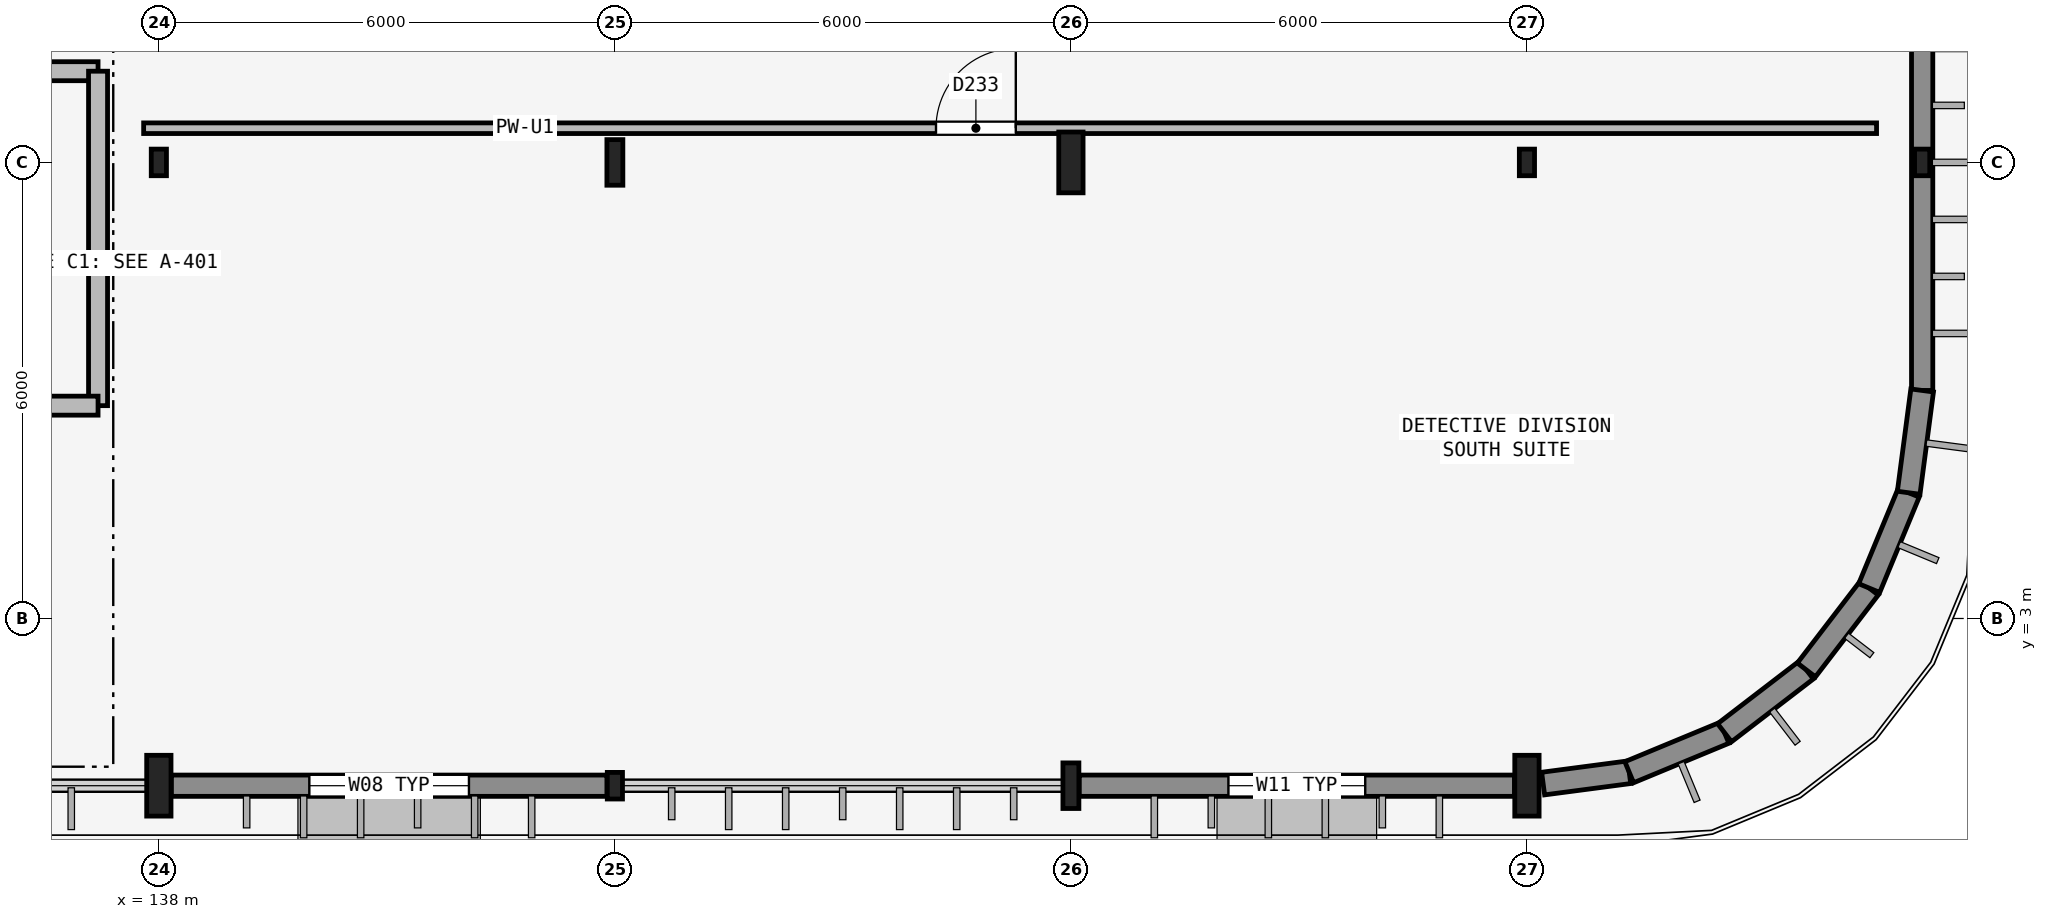
"""IFC4 building model, lengths in metres.
Left out: names, types, materials, properties, quantities, classifications, styles, units other than length and angle.
Written with IfcOpenShell. Run it as: python <this file> out.ifc"""

import sys

from ifc_helpers import new_model, si_unit, direction, frame, frame_2d, origin, origin_2d, place, context, subcontext, project, spatial, rectangle, hollow_rectangle, i_section, extrude, element, fill, save


model = new_model("IFC4")
c1 = context("Model", 3, precision=1e-05, world=origin(), true_north=direction((0.0, 1.0)))
c2 = subcontext(c1, "Body", "Model", "MODEL_VIEW")
j1 = project(units=[si_unit("LENGTHUNIT", "METRE"), si_unit("PLANEANGLEUNIT", "RADIAN")], contexts=[c1])
p1 = place(None, origin())
s1 = spatial("IfcSite", under=j1, at=p1, CompositionType="ELEMENT")
p2 = place(p1, origin())
s2 = spatial("IfcBuilding", under=s1, at=p2, CompositionType="ELEMENT")
p3 = place(p2, frame((0.0, 0.0, 9.3)))
s3 = spatial("IfcBuildingStorey", under=s2, at=p3, CompositionType="ELEMENT", Elevation=9.3)
p4 = place(p3, frame((138.0, 0.8, 0.0), z_axis=(0.0, 0.0, 1.0), x_axis=(1.0, 0.0, 0.0)))
e1 = element("IfcColumn", 1, at=p4, inside=s3, PredefinedType="COLUMN", context=c2, shape_type="SweptSolid", body=[
    extrude(i_section(OverallWidth=0.32, OverallDepth=0.8, WebThickness=0.016, FlangeThickness=0.028, at=origin_2d()), origin(), (0.0, 0.0, 1.0), 4.2),
])
for number, where, z_axis, x_axis in (
    (2, (138.0, 9.0, 0.0), (0.0, 0.0, 1.0), (1.0, 0.0, 0.0)),
    (3, (144.0, 0.8, 0.0), (0.0, 0.0, 1.0), (1.0, 0.0, 0.0)),
):
    element("IfcColumn", number, at=place(p3, frame(where, z_axis=z_axis, x_axis=x_axis)), inside=s3, PredefinedType="COLUMN", context=c2, shape_type="SweptSolid", body=[
        extrude(hollow_rectangle(XDim=0.2, YDim=0.35, WallThickness=0.012, InnerFilletRadius=0.012, OuterFilletRadius=0.024, at=origin_2d()), origin(), (0.0, 0.0, 1.0), 4.2),
    ])
for number, where, z_axis, x_axis in (
    (4, (144.0, 9.0, 0.0), (0.0, 0.0, 1.0), (1.0, 0.0, 0.0)),
    (5, (150.0, 0.8, 0.0), (0.0, 0.0, 1.0), (1.0, 0.0, 0.0)),
):
    element("IfcColumn", number, at=place(p3, frame(where, z_axis=z_axis, x_axis=x_axis)), inside=s3, PredefinedType="COLUMN", context=c2, shape_type="SweptSolid", body=[
        extrude(i_section(OverallWidth=0.21, OverallDepth=0.6, WebThickness=0.012, FlangeThickness=0.021, FilletRadius=0.02, at=origin_2d()), origin(), (0.0, 0.0, 1.0), 4.2),
    ])
for number, where, z_axis, x_axis in (
    (6, (150.0, 9.0, 0.0), (0.0, 0.0, 1.0), (1.0, 0.0, 0.0)),
    (7, (156.0, 0.8, 0.0), (0.0, 0.0, 1.0), (1.0, 0.0, 0.0)),
):
    element("IfcColumn", number, at=place(p3, frame(where, z_axis=z_axis, x_axis=x_axis)), inside=s3, PredefinedType="COLUMN", context=c2, shape_type="SweptSolid", body=[
        extrude(i_section(OverallWidth=0.32, OverallDepth=0.8, WebThickness=0.016, FlangeThickness=0.028, at=origin_2d()), origin(), (0.0, 0.0, 1.0), 4.2),
    ])
for number, where, z_axis, x_axis in (
    (8, (156.0, 9.0, 0.0), (0.0, 0.0, 1.0), (1.0, 0.0, 0.0)),
    (9, (161.2, 9.0, 0.0), (0.0, 0.0, 1.0), (1.0, 0.0, 0.0)),
):
    element("IfcColumn", number, at=place(p3, frame(where, z_axis=z_axis, x_axis=x_axis)), inside=s3, PredefinedType="COLUMN", context=c2, shape_type="SweptSolid", body=[
        extrude(hollow_rectangle(XDim=0.2, YDim=0.35, WallThickness=0.012, InnerFilletRadius=0.012, OuterFilletRadius=0.024, at=origin_2d()), origin(), (0.0, 0.0, 1.0), 4.2),
    ])
p5 = place(p3, frame((138.164, 0.8, 0.0), z_axis=(0.0, 0.0, 1.0), x_axis=(1.0, 0.0, 0.0)))
e10 = element("IfcWall", 10, at=p5, inside=s3, PredefinedType="SOLIDWALL", context=c2, shape_type="SweptSolid", body=[
    extrude(rectangle(XDim=5.732, YDim=0.28, at=frame_2d((2.866, 0.0))), origin(), (0.0, 0.0, 1.0), 3.484),
])
p6 = place(p5, frame((1.816, 0.0, 0.9)))
e11 = element("IfcOpeningElement", 11, at=p6, cuts=e10, PredefinedType="OPENING", context=c2, shape_type="SweptSolid", body=[
    extrude(rectangle(XDim=2.1, YDim=1.5, at=frame_2d((1.05, 0.75))), frame((0.0, 0.15, 0.0), z_axis=(0.0, -1.0, 0.0), x_axis=(1.0, 0.0, 0.0)), (0.0, 0.0, 1.0), 0.3),
])
p7 = place(p3, frame((150.109, 0.8, 0.0), z_axis=(0.0, 0.0, 1.0), x_axis=(1.0, 0.0, 0.0)))
e12 = element("IfcWall", 12, at=p7, inside=s3, PredefinedType="SOLIDWALL", context=c2, shape_type="SweptSolid", body=[
    extrude(rectangle(XDim=5.727, YDim=0.28, at=frame_2d((2.864, 0.0))), origin(), (0.0, 0.0, 1.0), 3.484),
])
p8 = place(p7, frame((1.963, 0.0, 0.6)))
e13 = element("IfcOpeningElement", 13, at=p8, cuts=e12, PredefinedType="OPENING", context=c2, shape_type="SweptSolid", body=[
    extrude(rectangle(XDim=1.8, YDim=2.2, at=frame_2d((0.9, 1.1))), frame((0.0, 0.15, 0.0), z_axis=(0.0, -1.0, 0.0), x_axis=(1.0, 0.0, 0.0)), (0.0, 0.0, 1.0), 0.3),
])
p9 = place(p3, frame((161.2, 6.0, 0.0), z_axis=(0.0, 0.0, 1.0), x_axis=(0.0, 1.0, 0.0)))
e14 = element("IfcWall", 14, at=p9, inside=s3, PredefinedType="SOLIDWALL", context=c2, shape_type="SweptSolid", body=[
    extrude(rectangle(XDim=6.0, YDim=0.28, at=frame_2d((3.0, 0.0))), origin(), (0.0, 0.0, 1.0), 3.49),
])
p10 = place(p3, frame((156.213, 0.828, 0.0), z_axis=(0.0, 0.0, 1.0), x_axis=(0.991417173479, 0.130736330569, 0.0)))
e15 = element("IfcWall", 15, at=p10, inside=s3, PredefinedType="SOLIDWALL", context=c2, shape_type="SweptSolid", body=[
    extrude(rectangle(XDim=1.143, YDim=0.3, at=frame_2d((0.571, 0.0))), origin(), (0.0, 0.0, 1.0), 3.484),
])
for number, where, z_axis, x_axis in (
    (16, (157.346, 0.977, 0.0), (0.0, 0.0, 1.0), (0.924, 0.383, 0.0)),
    (17, (158.6, 1.497, 0.0), (0.0, 0.0, 1.0), (0.793, 0.609, 0.0)),
    (18, (159.677, 2.323, 0.0), (0.0, 0.0, 1.0), (0.609, 0.793, 0.0)),
    (19, (160.503, 3.4, 0.0), (0.0, 0.0, 1.0), (0.383, 0.924, 0.0)),
):
    element("IfcWall", number, at=place(p3, frame(where, z_axis=z_axis, x_axis=x_axis)), inside=s3, PredefinedType="SOLIDWALL", context=c2, shape_type="SweptSolid", body=[
        extrude(rectangle(XDim=1.357, YDim=0.3, at=frame_2d((0.679, 0.0))), origin(), (0.0, 0.0, 1.0), 3.895),
    ])
p11 = place(p3, frame((161.023, 4.654, 0.0), z_axis=(0.0, 0.0, 1.0), x_axis=(0.130561507967, 0.991440211328, 0.0)))
e20 = element("IfcWall", 20, at=p11, inside=s3, PredefinedType="SOLIDWALL", context=c2, shape_type="SweptSolid", body=[
    extrude(rectangle(XDim=1.358, YDim=0.3, at=frame_2d((0.679, 0.0))), origin(), (0.0, 0.0, 1.0), 3.895),
])
p12 = place(p3, frame((131.55, 10.2, 0.0), z_axis=(0.0, 0.0, 1.0), x_axis=(1.0, 0.0, 0.0)))
e21 = element("IfcWall", 21, at=p12, inside=s3, PredefinedType="PARTITIONING", context=c2, shape_type="SweptSolid", body=[
    extrude(rectangle(XDim=5.65, YDim=0.25, at=frame_2d((2.825, 0.0))), origin(), (0.0, 0.0, 1.0), 3.566),
])
p13 = place(p12, frame((2.075, 0.0, 0.0)))
e22 = element("IfcOpeningElement", 22, at=p13, cuts=e21, PredefinedType="OPENING", context=c2, shape_type="SweptSolid", body=[
    extrude(rectangle(XDim=1.5, YDim=2.15, at=frame_2d((0.75, 1.075))), frame((0.0, 0.135, 0.0), z_axis=(0.0, -1.0, 0.0), x_axis=(1.0, 0.0, 0.0)), (0.0, 0.0, 1.0), 0.27),
])
p14 = place(p3, frame((137.2, 5.8, 0.0), z_axis=(0.0, 0.0, 1.0), x_axis=(0.0, 1.0, 0.0)))
e23 = element("IfcWall", 23, at=p14, inside=s3, PredefinedType="PARTITIONING", context=c2, shape_type="SweptSolid", body=[
    extrude(rectangle(XDim=4.4, YDim=0.25, at=frame_2d((2.2, 0.0))), origin(), (0.0, 0.0, 1.0), 3.39),
])
p15 = place(p3, frame((135.6, 5.8, 0.0), z_axis=(0.0, 0.0, 1.0), x_axis=(1.0, 0.0, 0.0)))
e24 = element("IfcWall", 24, at=p15, inside=s3, PredefinedType="PARTITIONING", context=c2, shape_type="SweptSolid", body=[
    extrude(rectangle(XDim=1.6, YDim=0.25, at=frame_2d((0.8, 0.0))), origin(), (0.0, 0.0, 1.0), 3.89),
])
p16 = place(p3, frame((137.8, 9.45, 0.0), z_axis=(0.0, 0.0, 1.0), x_axis=(1.0, 0.0, 0.0)))
e25 = element("IfcWall", 25, at=p16, inside=s3, PredefinedType="PARTITIONING", context=c2, shape_type="SweptSolid", body=[
    extrude(rectangle(XDim=22.8, YDim=0.14, at=frame_2d((11.4, 0.0))), origin(), (0.0, 0.0, 1.0), 3.49),
])
p17 = place(p16, frame((10.425, 0.0, 0.0)))
e26 = element("IfcOpeningElement", 26, at=p17, cuts=e25, PredefinedType="OPENING", context=c2, shape_type="SweptSolid", body=[
    extrude(rectangle(XDim=1.05, YDim=2.2, at=frame_2d((0.525, 1.1))), frame((0.0, 0.08, 0.0), z_axis=(0.0, -1.0, 0.0), x_axis=(1.0, 0.0, 0.0)), (0.0, 0.0, 1.0), 0.16),
])
p18 = place(p6, origin())
e27 = element("IfcWindow", 27, at=p18, inside=s3, PartitioningType="SINGLE_PANEL", PredefinedType="WINDOW", context=c2, shape_type="SweptSolid", body=[
    extrude(rectangle(XDim=2.1, YDim=1.5, at=frame_2d((1.05, 0.75))), frame((0.0, 0.03, 0.0), z_axis=(0.0, -1.0, 0.0), x_axis=(1.0, 0.0, 0.0)), (0.0, 0.0, 1.0), 0.06),
])
fill(e11, e27)
p19 = place(p8, origin())
e28 = element("IfcWindow", 28, at=p19, inside=s3, PartitioningType="SINGLE_PANEL", PredefinedType="WINDOW", context=c2, shape_type="SweptSolid", body=[
    extrude(rectangle(XDim=1.8, YDim=2.2, at=frame_2d((0.9, 1.1))), frame((0.0, 0.03, 0.0), z_axis=(0.0, -1.0, 0.0), x_axis=(1.0, 0.0, 0.0)), (0.0, 0.0, 1.0), 0.06),
])
fill(e13, e28)
p20 = place(p17, origin())
e29 = element("IfcDoor", 29, at=p20, inside=s3, OperationType="SINGLE_SWING_RIGHT", PredefinedType="DOOR", context=c2, shape_type="SweptSolid", body=[
    extrude(rectangle(XDim=1.05, YDim=2.2, at=frame_2d((0.525, 1.1))), frame((0.0, 0.025, 0.0), z_axis=(0.0, -1.0, 0.0), x_axis=(1.0, 0.0, 0.0)), (0.0, 0.0, 1.0), 0.05),
])
fill(e26, e29)
save(model, sys.argv[1])
